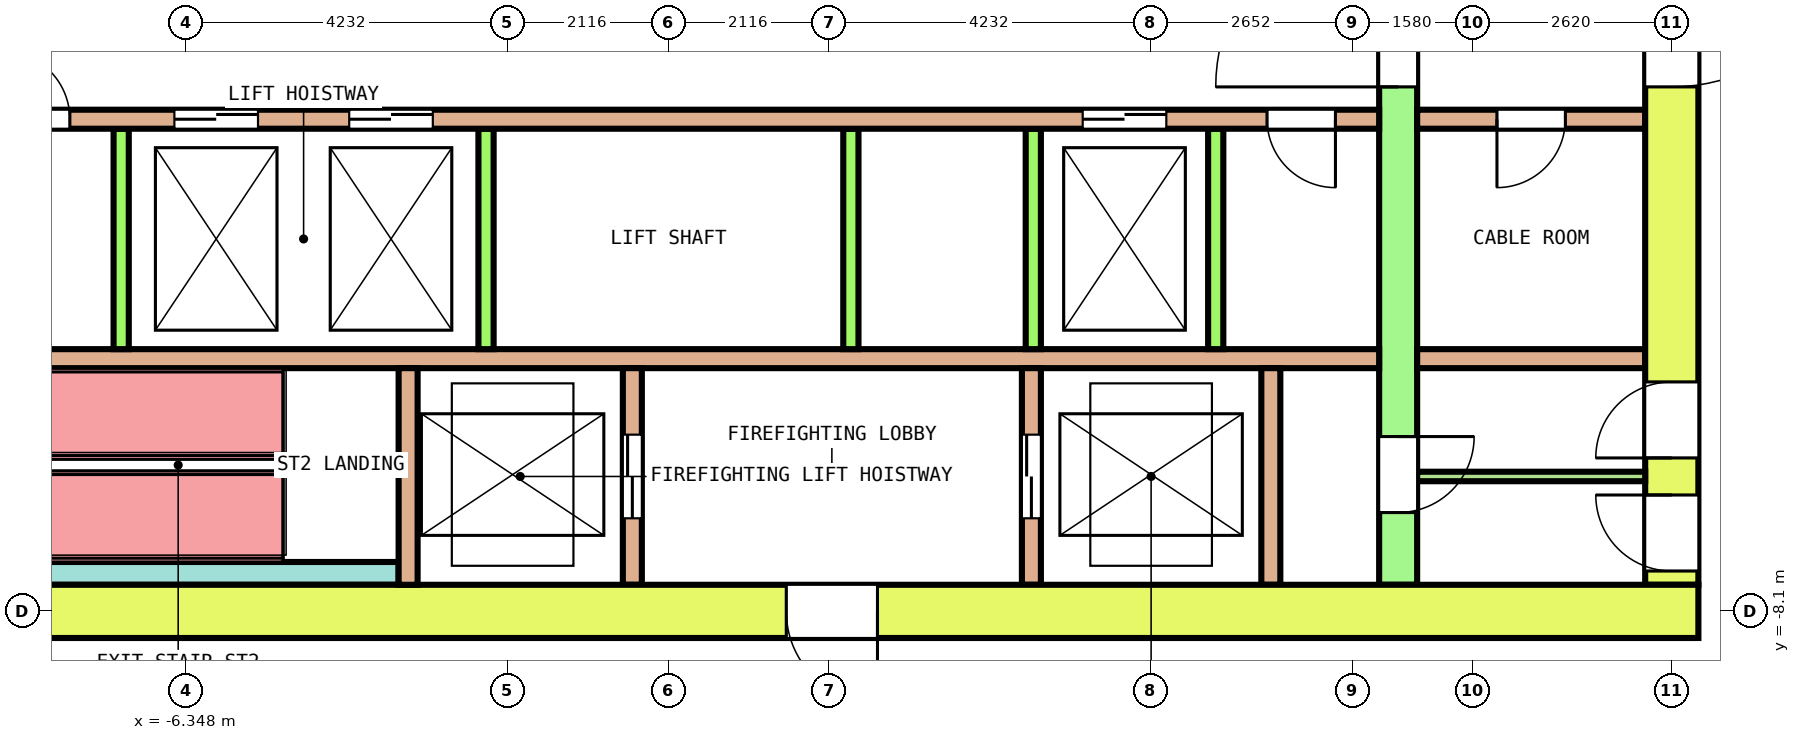
"""IFC4 building model, lengths in metres.
Left out: names, types, materials, properties, quantities, classifications, styles, units other than length and angle.
Written with IfcOpenShell. Run it as: python <this file> out.ifc"""

import sys

from ifc_helpers import new_model, si_unit, direction, frame, frame_2d, origin, place, context, subcontext, project, spatial, rectangle, extrude, element, fill, save


model = new_model("IFC4")
c1 = context("Model", 3, precision=1e-05, world=origin(), true_north=direction((0.0, 1.0)))
c2 = subcontext(c1, "Body", "Model", "MODEL_VIEW")
j1 = project(units=[si_unit("LENGTHUNIT", "METRE"), si_unit("PLANEANGLEUNIT", "RADIAN")], contexts=[c1])
p1 = place(None, origin())
s1 = spatial("IfcSite", under=j1, at=p1, CompositionType="ELEMENT")
p2 = place(p1, origin())
s2 = spatial("IfcBuilding", under=s1, at=p2, CompositionType="ELEMENT")
p3 = place(p2, frame((0.0, 0.0, 184.8)))
s3 = spatial("IfcBuildingStorey", under=s2, at=p3, CompositionType="ELEMENT", Elevation=184.8)
p4 = place(p3, frame((-13.55, -8.1, 0.0), z_axis=(0.0, 0.0, 1.0), x_axis=(1.0, 0.0, 0.0)))
e1 = element("IfcWall", 1, at=p4, inside=s3, PredefinedType="SHEAR", context=c2, shape_type="SweptSolid", body=[
    extrude(rectangle(XDim=27.1, YDim=0.7, at=frame_2d((13.55, 0.0))), origin(), (0.0, 0.0, 1.0), 4.1),
])
p5 = place(p4, frame((15.1, 0.0, 0.0)))
e2 = element("IfcOpeningElement", 2, at=p5, cuts=e1, PredefinedType="OPENING", context=c2, shape_type="SweptSolid", body=[
    extrude(rectangle(XDim=1.2, YDim=2.1, at=frame_2d((0.6, 1.05))), frame((0.0, 0.36, 0.0), z_axis=(0.0, -1.0, 0.0), x_axis=(1.0, 0.0, 0.0)), (0.0, 0.0, 1.0), 0.72),
])
p6 = place(p3, frame((13.2, -7.75, 0.0), z_axis=(0.0, 0.0, 1.0), x_axis=(0.0, 1.0, 0.0)))
e3 = element("IfcWall", 3, at=p6, inside=s3, PredefinedType="SHEAR", context=c2, shape_type="SweptSolid", body=[
    extrude(rectangle(XDim=15.5, YDim=0.7, at=frame_2d((7.75, 0.0))), origin(), (0.0, 0.0, 1.0), 4.1),
])
p7 = place(p6, frame((6.55, 0.0, 0.0)))
e4 = element("IfcOpeningElement", 4, at=p7, cuts=e3, PredefinedType="OPENING", context=c2, shape_type="SweptSolid", body=[
    extrude(rectangle(XDim=2.4, YDim=2.1, at=frame_2d((1.2, 1.05))), frame((0.0, 0.36, 0.0), z_axis=(0.0, -1.0, 0.0), x_axis=(1.0, 0.0, 0.0)), (0.0, 0.0, 1.0), 0.72),
])
p8 = place(p6, frame((13.45, 0.0, 0.0)))
e5 = element("IfcOpeningElement", 5, at=p8, cuts=e3, PredefinedType="OPENING", context=c2, shape_type="SweptSolid", body=[
    extrude(rectangle(XDim=1.2, YDim=2.1, at=frame_2d((0.6, 1.05))), frame((0.0, 0.36, 0.0), z_axis=(0.0, -1.0, 0.0), x_axis=(1.0, 0.0, 0.0)), (0.0, 0.0, 1.0), 0.72),
])
p9 = place(p6, frame((0.181, 0.0, 0.0)))
e6 = element("IfcOpeningElement", 6, at=p9, cuts=e3, PredefinedType="OPENING", context=c2, shape_type="SweptSolid", body=[
    extrude(rectangle(XDim=1.0, YDim=2.1, at=frame_2d((0.5, 1.05))), frame((0.0, 0.36, 0.0), z_axis=(0.0, -1.0, 0.0), x_axis=(1.0, 0.0, 0.0)), (0.0, 0.0, 1.0), 0.72),
])
p10 = place(p6, frame((1.669, 0.0, 0.0)))
e7 = element("IfcOpeningElement", 7, at=p10, cuts=e3, PredefinedType="OPENING", context=c2, shape_type="SweptSolid", body=[
    extrude(rectangle(XDim=1.0, YDim=2.1, at=frame_2d((0.5, 1.05))), frame((0.0, 0.36, 0.0), z_axis=(0.0, -1.0, 0.0), x_axis=(1.0, 0.0, 0.0)), (0.0, 0.0, 1.0), 0.72),
])
p11 = place(p3, frame((9.6, -7.75, 0.0), z_axis=(0.0, 0.0, 1.0), x_axis=(0.0, 1.0, 0.0)))
e8 = element("IfcWall", 8, at=p11, inside=s3, PredefinedType="SHEAR", context=c2, shape_type="SweptSolid", body=[
    extrude(rectangle(XDim=15.5, YDim=0.5, at=frame_2d((7.75, 0.0))), origin(), (0.0, 0.0, 1.0), 4.1),
])
p12 = place(p11, frame((6.55, 0.0, 0.0)))
e9 = element("IfcOpeningElement", 9, at=p12, cuts=e8, PredefinedType="OPENING", context=c2, shape_type="SweptSolid", body=[
    extrude(rectangle(XDim=2.4, YDim=2.1, at=frame_2d((1.2, 1.05))), frame((0.0, 0.26, 0.0), z_axis=(0.0, -1.0, 0.0), x_axis=(1.0, 0.0, 0.0)), (0.0, 0.0, 1.0), 0.52),
])
p13 = place(p11, frame((13.45, 0.0, 0.0)))
e10 = element("IfcOpeningElement", 10, at=p13, cuts=e8, PredefinedType="OPENING", context=c2, shape_type="SweptSolid", body=[
    extrude(rectangle(XDim=1.2, YDim=2.1, at=frame_2d((0.6, 1.05))), frame((0.0, 0.26, 0.0), z_axis=(0.0, -1.0, 0.0), x_axis=(1.0, 0.0, 0.0)), (0.0, 0.0, 1.0), 0.52),
])
p14 = place(p11, frame((0.95, 0.0, 0.0)))
e11 = element("IfcOpeningElement", 11, at=p14, cuts=e8, PredefinedType="OPENING", context=c2, shape_type="SweptSolid", body=[
    extrude(rectangle(XDim=1.0, YDim=2.1, at=frame_2d((0.5, 1.05))), frame((0.0, 0.26, 0.0), z_axis=(0.0, -1.0, 0.0), x_axis=(1.0, 0.0, 0.0)), (0.0, 0.0, 1.0), 0.52),
])
p15 = place(p3, frame((-9.35, -1.625, 0.0), z_axis=(0.0, 0.0, 1.0), x_axis=(1.0, 0.0, 0.0)))
e12 = element("IfcWall", 12, at=p15, inside=s3, PredefinedType="SOLIDWALL", context=c2, shape_type="SweptSolid", body=[
    extrude(rectangle(XDim=18.7, YDim=0.25, at=frame_2d((9.35, 0.0))), origin(), (0.0, 0.0, 1.0), 4.1),
])
p16 = place(p15, frame((2.85, 0.0, 0.0)))
e13 = element("IfcOpeningElement", 13, at=p16, cuts=e12, PredefinedType="OPENING", context=c2, shape_type="SweptSolid", body=[
    extrude(rectangle(XDim=1.1, YDim=2.1, at=frame_2d((0.55, 1.05))), frame((0.0, 0.135, 0.0), z_axis=(0.0, -1.0, 0.0), x_axis=(1.0, 0.0, 0.0)), (0.0, 0.0, 1.0), 0.27),
])
p17 = place(p15, frame((5.15, 0.0, 0.0)))
e14 = element("IfcOpeningElement", 14, at=p17, cuts=e12, PredefinedType="OPENING", context=c2, shape_type="SweptSolid", body=[
    extrude(rectangle(XDim=1.1, YDim=2.1, at=frame_2d((0.55, 1.05))), frame((0.0, 0.135, 0.0), z_axis=(0.0, -1.0, 0.0), x_axis=(1.0, 0.0, 0.0)), (0.0, 0.0, 1.0), 0.27),
])
p18 = place(p15, frame((14.8, 0.0, 0.0)))
e15 = element("IfcOpeningElement", 15, at=p18, cuts=e12, PredefinedType="OPENING", context=c2, shape_type="SweptSolid", body=[
    extrude(rectangle(XDim=1.1, YDim=2.1, at=frame_2d((0.55, 1.05))), frame((0.0, 0.135, 0.0), z_axis=(0.0, -1.0, 0.0), x_axis=(1.0, 0.0, 0.0)), (0.0, 0.0, 1.0), 0.27),
])
p19 = place(p15, frame((0.575, 0.0, 0.0)))
e16 = element("IfcOpeningElement", 16, at=p19, cuts=e12, PredefinedType="OPENING", context=c2, shape_type="SweptSolid", body=[
    extrude(rectangle(XDim=0.9, YDim=2.1, at=frame_2d((0.45, 1.05))), frame((0.0, 0.135, 0.0), z_axis=(0.0, -1.0, 0.0), x_axis=(1.0, 0.0, 0.0)), (0.0, 0.0, 1.0), 0.27),
])
p20 = place(p15, frame((17.225, 0.0, 0.0)))
e17 = element("IfcOpeningElement", 17, at=p20, cuts=e12, PredefinedType="OPENING", context=c2, shape_type="SweptSolid", body=[
    extrude(rectangle(XDim=0.9, YDim=2.1, at=frame_2d((0.45, 1.05))), frame((0.0, 0.135, 0.0), z_axis=(0.0, -1.0, 0.0), x_axis=(1.0, 0.0, 0.0)), (0.0, 0.0, 1.0), 0.27),
])
p21 = place(p3, frame((9.85, -1.625, 0.0), z_axis=(0.0, 0.0, 1.0), x_axis=(1.0, 0.0, 0.0)))
e18 = element("IfcWall", 18, at=p21, inside=s3, PredefinedType="SOLIDWALL", context=c2, shape_type="SweptSolid", body=[
    extrude(rectangle(XDim=3.0, YDim=0.25, at=frame_2d((1.5, 0.0))), origin(), (0.0, 0.0, 1.0), 4.1),
])
p22 = place(p21, frame((1.05, 0.0, 0.0)))
e19 = element("IfcOpeningElement", 19, at=p22, cuts=e18, PredefinedType="OPENING", context=c2, shape_type="SweptSolid", body=[
    extrude(rectangle(XDim=0.9, YDim=2.1, at=frame_2d((0.45, 1.05))), frame((0.0, 0.135, 0.0), z_axis=(0.0, -1.0, 0.0), x_axis=(1.0, 0.0, 0.0)), (0.0, 0.0, 1.0), 0.27),
])
p23 = place(p3, frame((-9.35, -4.775, 0.0), z_axis=(0.0, 0.0, 1.0), x_axis=(1.0, 0.0, 0.0)))
e20 = element("IfcWall", 20, at=p23, inside=s3, PredefinedType="SOLIDWALL", context=c2, shape_type="SweptSolid", body=[
    extrude(rectangle(XDim=18.7, YDim=0.25, at=frame_2d((9.35, 0.0))), origin(), (0.0, 0.0, 1.0), 4.1),
])
p24 = place(p3, frame((9.85, -4.775, 0.0), z_axis=(0.0, 0.0, 1.0), x_axis=(1.0, 0.0, 0.0)))
e21 = element("IfcWall", 21, at=p24, inside=s3, PredefinedType="SOLIDWALL", context=c2, shape_type="SweptSolid", body=[
    extrude(rectangle(XDim=3.0, YDim=0.25, at=frame_2d((1.5, 0.0))), origin(), (0.0, 0.0, 1.0), 4.1),
])
for number, where, z_axis, x_axis in (
    (22, (-7.2, -4.65, 0.0), (0.0, 0.0, 1.0), (0.0, 1.0, 0.0)),
    (23, (-2.4, -4.65, 0.0), (0.0, 0.0, 1.0), (0.0, 1.0, 0.0)),
    (24, (2.4, -4.65, 0.0), (0.0, 0.0, 1.0), (0.0, 1.0, 0.0)),
    (25, (4.8, -4.65, 0.0), (0.0, 0.0, 1.0), (0.0, 1.0, 0.0)),
    (26, (7.2, -4.65, 0.0), (0.0, 0.0, 1.0), (0.0, 1.0, 0.0)),
):
    element("IfcWall", number, at=place(p3, frame(where, z_axis=z_axis, x_axis=x_axis)), inside=s3, PredefinedType="SOLIDWALL", context=c2, shape_type="SweptSolid", body=[
        extrude(rectangle(XDim=2.9, YDim=0.2, at=frame_2d((1.45, 0.0))), origin(), (0.0, 0.0, 1.0), 4.1),
    ])
p25 = place(p3, frame((-9.35, -7.6, 0.0), z_axis=(0.0, 0.0, 1.0), x_axis=(1.0, 0.0, 0.0)))
e27 = element("IfcWall", 27, at=p25, inside=s3, PredefinedType="SOLIDWALL", context=c2, shape_type="SweptSolid", body=[
    extrude(rectangle(XDim=5.8, YDim=0.3, at=frame_2d((2.9, 0.0))), origin(), (0.0, 0.0, 1.0), 4.1),
])
p26 = place(p3, frame((-3.425, -7.75, 0.0), z_axis=(0.0, 0.0, 1.0), x_axis=(0.0, 1.0, 0.0)))
e28 = element("IfcWall", 28, at=p26, inside=s3, PredefinedType="SOLIDWALL", context=c2, shape_type="SweptSolid", body=[
    extrude(rectangle(XDim=2.85, YDim=0.25, at=frame_2d((1.425, 0.0))), origin(), (0.0, 0.0, 1.0), 4.1),
])
p27 = place(p3, frame((-0.475, -7.75, 0.0), z_axis=(0.0, 0.0, 1.0), x_axis=(0.0, 1.0, 0.0)))
e29 = element("IfcWall", 29, at=p27, inside=s3, PredefinedType="SOLIDWALL", context=c2, shape_type="SweptSolid", body=[
    extrude(rectangle(XDim=2.85, YDim=0.25, at=frame_2d((1.425, 0.0))), origin(), (0.0, 0.0, 1.0), 4.1),
])
p28 = place(p27, frame((0.875, 0.0, 0.0)))
e30 = element("IfcOpeningElement", 30, at=p28, cuts=e29, PredefinedType="OPENING", context=c2, shape_type="SweptSolid", body=[
    extrude(rectangle(XDim=1.1, YDim=2.1, at=frame_2d((0.55, 1.05))), frame((0.0, 0.135, 0.0), z_axis=(0.0, -1.0, 0.0), x_axis=(1.0, 0.0, 0.0)), (0.0, 0.0, 1.0), 0.27),
])
p29 = place(p3, frame((4.775, -7.75, 0.0), z_axis=(0.0, 0.0, 1.0), x_axis=(0.0, 1.0, 0.0)))
e31 = element("IfcWall", 31, at=p29, inside=s3, PredefinedType="SOLIDWALL", context=c2, shape_type="SweptSolid", body=[
    extrude(rectangle(XDim=2.85, YDim=0.25, at=frame_2d((1.425, 0.0))), origin(), (0.0, 0.0, 1.0), 4.1),
])
p30 = place(p29, frame((0.875, 0.0, 0.0)))
e32 = element("IfcOpeningElement", 32, at=p30, cuts=e31, PredefinedType="OPENING", context=c2, shape_type="SweptSolid", body=[
    extrude(rectangle(XDim=1.1, YDim=2.1, at=frame_2d((0.55, 1.05))), frame((0.0, 0.135, 0.0), z_axis=(0.0, -1.0, 0.0), x_axis=(1.0, 0.0, 0.0)), (0.0, 0.0, 1.0), 0.27),
])
p31 = place(p3, frame((7.925, -7.75, 0.0), z_axis=(0.0, 0.0, 1.0), x_axis=(0.0, 1.0, 0.0)))
e33 = element("IfcWall", 33, at=p31, inside=s3, PredefinedType="SOLIDWALL", context=c2, shape_type="SweptSolid", body=[
    extrude(rectangle(XDim=2.85, YDim=0.25, at=frame_2d((1.425, 0.0))), origin(), (0.0, 0.0, 1.0), 4.1),
])
p32 = place(p3, frame((9.85, -6.325, 0.0), z_axis=(0.0, 0.0, 1.0), x_axis=(1.0, 0.0, 0.0)))
e34 = element("IfcWall", 34, at=p32, inside=s3, PredefinedType="PARTITIONING", context=c2, shape_type="SweptSolid", body=[
    extrude(rectangle(XDim=3.0, YDim=0.125, at=frame_2d((1.5, 0.0))), origin(), (0.0, 0.0, 1.0), 4.1),
])
p33 = place(p16, origin())
e35 = element("IfcDoor", 35, at=p33, inside=s3, OperationType="DOUBLE_DOOR_SLIDING", PredefinedType="DOOR", context=c2, shape_type="SweptSolid", body=[
    extrude(rectangle(XDim=1.1, YDim=2.1, at=frame_2d((0.55, 1.05))), frame((0.0, 0.075, 0.0), z_axis=(0.0, -1.0, 0.0), x_axis=(1.0, 0.0, 0.0)), (0.0, 0.0, 1.0), 0.15),
])
fill(e13, e35)
p34 = place(p17, origin())
e36 = element("IfcDoor", 36, at=p34, inside=s3, OperationType="DOUBLE_DOOR_SLIDING", PredefinedType="DOOR", context=c2, shape_type="SweptSolid", body=[
    extrude(rectangle(XDim=1.1, YDim=2.1, at=frame_2d((0.55, 1.05))), frame((0.0, 0.075, 0.0), z_axis=(0.0, -1.0, 0.0), x_axis=(1.0, 0.0, 0.0)), (0.0, 0.0, 1.0), 0.15),
])
fill(e14, e36)
p35 = place(p18, origin())
e37 = element("IfcDoor", 37, at=p35, inside=s3, OperationType="DOUBLE_DOOR_SLIDING", PredefinedType="DOOR", context=c2, shape_type="SweptSolid", body=[
    extrude(rectangle(XDim=1.1, YDim=2.1, at=frame_2d((0.55, 1.05))), frame((0.0, 0.075, 0.0), z_axis=(0.0, -1.0, 0.0), x_axis=(1.0, 0.0, 0.0)), (0.0, 0.0, 1.0), 0.15),
])
fill(e15, e37)
p36 = place(p28, origin())
e38 = element("IfcDoor", 38, at=p36, inside=s3, OperationType="DOUBLE_DOOR_SLIDING", PredefinedType="DOOR", context=c2, shape_type="SweptSolid", body=[
    extrude(rectangle(XDim=1.1, YDim=2.1, at=frame_2d((0.55, 1.05))), frame((0.0, 0.075, 0.0), z_axis=(0.0, -1.0, 0.0), x_axis=(1.0, 0.0, 0.0)), (0.0, 0.0, 1.0), 0.15),
])
fill(e30, e38)
p37 = place(p30, origin())
e39 = element("IfcDoor", 39, at=p37, inside=s3, OperationType="DOUBLE_DOOR_SLIDING", PredefinedType="DOOR", context=c2, shape_type="SweptSolid", body=[
    extrude(rectangle(XDim=1.1, YDim=2.1, at=frame_2d((0.55, 1.05))), frame((0.0, 0.075, 0.0), z_axis=(0.0, -1.0, 0.0), x_axis=(1.0, 0.0, 0.0)), (0.0, 0.0, 1.0), 0.15),
])
fill(e32, e39)
p38 = place(p12, origin())
e40 = element("IfcDoor", 40, at=p38, inside=s3, OperationType="DOUBLE_DOOR_SINGLE_SWING", PredefinedType="DOOR", context=c2, shape_type="SweptSolid", body=[
    extrude(rectangle(XDim=2.4, YDim=2.1, at=frame_2d((1.2, 1.05))), frame((0.0, 0.2, 0.0), z_axis=(0.0, -1.0, 0.0), x_axis=(1.0, 0.0, 0.0)), (0.0, 0.0, 1.0), 0.4),
])
fill(e9, e40)
p39 = place(p7, origin())
e41 = element("IfcDoor", 41, at=p39, inside=s3, OperationType="DOUBLE_DOOR_SINGLE_SWING", PredefinedType="DOOR", context=c2, shape_type="SweptSolid", body=[
    extrude(rectangle(XDim=2.4, YDim=2.1, at=frame_2d((1.2, 1.05))), frame((0.0, 0.3, 0.0), z_axis=(0.0, -1.0, 0.0), x_axis=(1.0, 0.0, 0.0)), (0.0, 0.0, 1.0), 0.6),
])
fill(e4, e41)
p40 = place(p5, origin())
e42 = element("IfcDoor", 42, at=p40, inside=s3, OperationType="SINGLE_SWING_LEFT", PredefinedType="DOOR", context=c2, shape_type="SweptSolid", body=[
    extrude(rectangle(XDim=1.2, YDim=2.1, at=frame_2d((0.6, 1.05))), frame((0.0, 0.3, 0.0), z_axis=(0.0, -1.0, 0.0), x_axis=(1.0, 0.0, 0.0)), (0.0, 0.0, 1.0), 0.6),
])
fill(e2, e42)
p41 = place(p14, origin())
e43 = element("IfcDoor", 43, at=p41, inside=s3, OperationType="SINGLE_SWING_LEFT", PredefinedType="DOOR", context=c2, shape_type="SweptSolid", body=[
    extrude(rectangle(XDim=1.0, YDim=2.1, at=frame_2d((0.5, 1.05))), frame((0.0, 0.2, 0.0), z_axis=(0.0, -1.0, 0.0), x_axis=(1.0, 0.0, 0.0)), (0.0, 0.0, 1.0), 0.4),
])
fill(e11, e43)
p42 = place(p9, origin())
e44 = element("IfcDoor", 44, at=p42, inside=s3, OperationType="SINGLE_SWING_RIGHT", PredefinedType="DOOR", context=c2, shape_type="SweptSolid", body=[
    extrude(rectangle(XDim=1.0, YDim=2.1, at=frame_2d((0.5, 1.05))), frame((0.0, 0.3, 0.0), z_axis=(0.0, -1.0, 0.0), x_axis=(1.0, 0.0, 0.0)), (0.0, 0.0, 1.0), 0.6),
])
fill(e6, e44)
p43 = place(p10, origin())
e45 = element("IfcDoor", 45, at=p43, inside=s3, OperationType="SINGLE_SWING_LEFT", PredefinedType="DOOR", context=c2, shape_type="SweptSolid", body=[
    extrude(rectangle(XDim=1.0, YDim=2.1, at=frame_2d((0.5, 1.05))), frame((0.0, 0.3, 0.0), z_axis=(0.0, -1.0, 0.0), x_axis=(1.0, 0.0, 0.0)), (0.0, 0.0, 1.0), 0.6),
])
fill(e7, e45)
p44 = place(p19, origin())
e46 = element("IfcDoor", 46, at=p44, inside=s3, OperationType="SINGLE_SWING_LEFT", PredefinedType="DOOR", context=c2, shape_type="SweptSolid", body=[
    extrude(rectangle(XDim=0.9, YDim=2.1, at=frame_2d((0.45, 1.05))), frame((0.0, 0.075, 0.0), z_axis=(0.0, -1.0, 0.0), x_axis=(1.0, 0.0, 0.0)), (0.0, 0.0, 1.0), 0.15),
])
fill(e16, e46)
p45 = place(p20, origin())
e47 = element("IfcDoor", 47, at=p45, inside=s3, OperationType="SINGLE_SWING_RIGHT", PredefinedType="DOOR", context=c2, shape_type="SweptSolid", body=[
    extrude(rectangle(XDim=0.9, YDim=2.1, at=frame_2d((0.45, 1.05))), frame((0.0, 0.075, 0.0), z_axis=(0.0, -1.0, 0.0), x_axis=(1.0, 0.0, 0.0)), (0.0, 0.0, 1.0), 0.15),
])
fill(e17, e47)
p46 = place(p22, origin())
e48 = element("IfcDoor", 48, at=p46, inside=s3, OperationType="SINGLE_SWING_LEFT", PredefinedType="DOOR", context=c2, shape_type="SweptSolid", body=[
    extrude(rectangle(XDim=0.9, YDim=2.1, at=frame_2d((0.45, 1.05))), frame((0.0, 0.075, 0.0), z_axis=(0.0, -1.0, 0.0), x_axis=(1.0, 0.0, 0.0)), (0.0, 0.0, 1.0), 0.15),
])
fill(e19, e48)
save(model, sys.argv[1])
